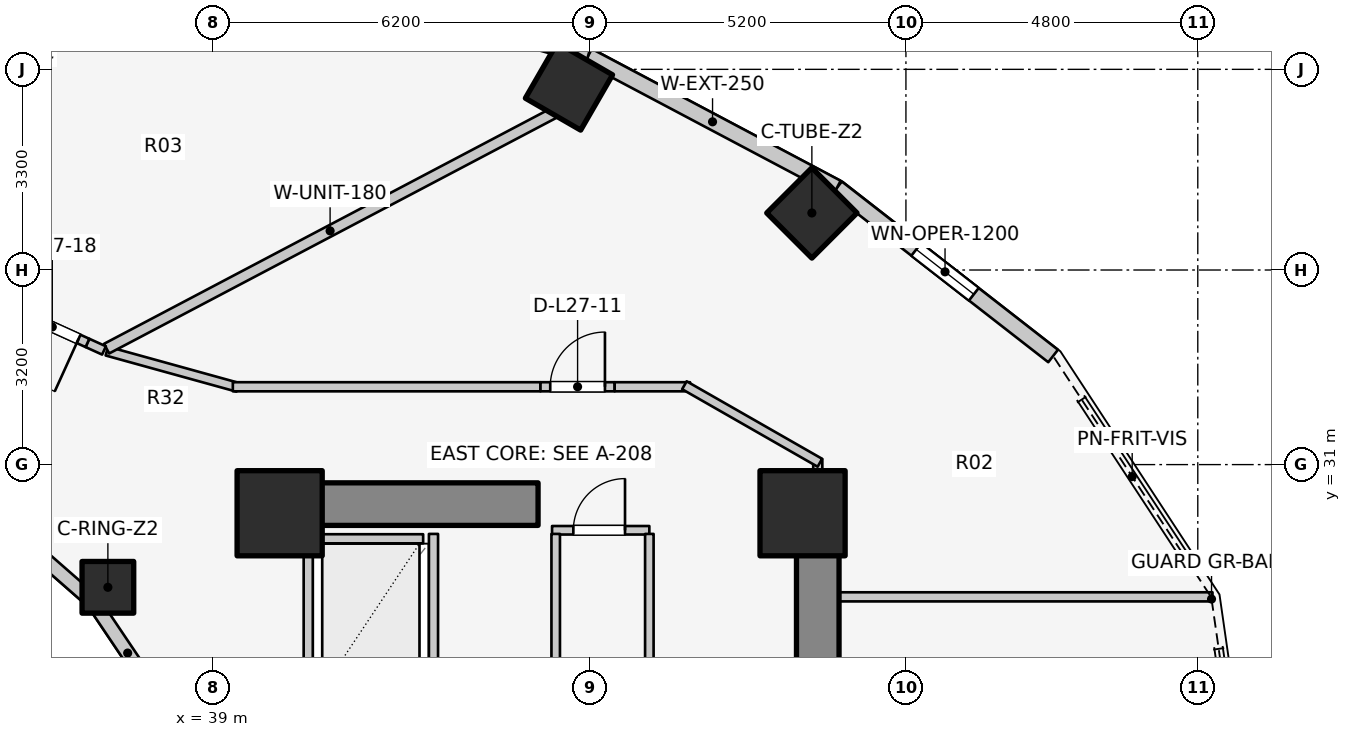
"""IFC4 building model, lengths in metres.
Left out: names, types, materials, properties, quantities, classifications, styles, units other than length and angle.
Written with IfcOpenShell. Run it as: python <this file> out.ifc"""

import sys

from ifc_helpers import new_model, si_unit, direction, frame, frame_2d, origin, origin_2d, place, context, subcontext, project, spatial, rectangle, extrude, element, fill, save


model = new_model("IFC4")
c1 = context("Model", 3, precision=1e-05, world=origin(), true_north=direction((0.0, 1.0)))
c2 = subcontext(c1, "Body", "Model", "MODEL_VIEW")
j1 = project(units=[si_unit("LENGTHUNIT", "METRE"), si_unit("PLANEANGLEUNIT", "RADIAN")], contexts=[c1])
p1 = place(None, origin())
s1 = spatial("IfcSite", under=j1, at=p1, CompositionType="ELEMENT")
p2 = place(p1, origin())
s2 = spatial("IfcBuilding", under=s1, at=p2, CompositionType="ELEMENT")
p3 = place(p2, frame((0.0, 0.0, 91.8)))
s3 = spatial("IfcBuildingStorey", under=s2, at=p3, CompositionType="ELEMENT", Elevation=91.8)
p4 = place(p3, frame((48.95, 17.05, 0.0), z_axis=(0.0, 0.0, 1.0), x_axis=(0.0, 1.0, 0.0)))
e1 = element("IfcWall", 1, at=p4, inside=s3, PredefinedType="SHEAR", context=c2, shape_type="SweptSolid", body=[
    extrude(rectangle(XDim=12.8, YDim=0.7, at=frame_2d((6.4, 0.0))), origin(), (0.0, 0.0, 1.0), 3.1),
])
p5 = place(p3, frame((39.85, 30.35, 0.0), z_axis=(0.0, 0.0, 1.0), x_axis=(1.0, 0.0, 0.0)))
e2 = element("IfcWall", 2, at=p5, inside=s3, PredefinedType="SHEAR", context=c2, shape_type="SweptSolid", body=[
    extrude(rectangle(XDim=4.5, YDim=0.7, at=frame_2d((2.25, 0.0))), origin(), (0.0, 0.0, 1.0), 3.1),
])
for number, where, z_axis, x_axis in (
    (3, (48.7, 30.2, 0.0), (0.0, 0.0, 1.0), (1.0, 0.0, 0.0)),
    (4, (40.1, 30.2, 0.0), (0.0, 0.0, 1.0), (1.0, 0.0, 0.0)),
):
    element("IfcColumn", number, at=place(p3, frame(where, z_axis=z_axis, x_axis=x_axis)), inside=s3, PredefinedType="COLUMN", context=c2, shape_type="SweptSolid", body=[
        extrude(rectangle(XDim=1.4, YDim=1.4, at=origin_2d()), origin(), (0.0, 0.0, 1.0), 3.1),
    ])
p6 = place(p3, frame((37.275, 28.982, 0.0), z_axis=(0.0, 0.0, 1.0), x_axis=(1.0, 0.0, 0.0)))
e5 = element("IfcColumn", 5, at=p6, inside=s3, PredefinedType="COLUMN", context=c2, shape_type="SweptSolid", body=[
    extrude(rectangle(XDim=0.85, YDim=0.85, at=origin_2d()), origin(), (0.0, 0.0, 1.0), 3.1),
])
for number, where, z_axis, x_axis in (
    (6, (48.853, 35.138, 0.0), (0.0, 0.0, 1.0), (0.707, 0.707, 0.0)),
    (7, (44.858, 37.218, 0.0), (0.0, 0.0, 1.0), (0.5, 0.866, 0.0)),
):
    element("IfcColumn", number, at=place(p3, frame(where, z_axis=z_axis, x_axis=x_axis)), inside=s3, PredefinedType="COLUMN", context=c2, shape_type="SweptSolid", body=[
        extrude(rectangle(XDim=1.05, YDim=1.05, at=origin_2d()), origin(), (0.0, 0.0, 1.0), 3.1),
    ])
p7 = place(p3, frame((38.166, 27.06, 0.0), z_axis=(0.0, 0.0, 1.0), x_axis=(-0.558197800898, 0.829707909492, 0.0)))
e8 = element("IfcWall", 8, at=p7, inside=s3, PredefinedType="STANDARD", context=c2, shape_type="SweptSolid", body=[
    extrude(rectangle(XDim=2.027, YDim=0.23, at=frame_2d((1.013, 0.0))), origin(), (0.0, 0.0, 1.0), 1.22),
])
p8 = place(p3, frame((37.035, 28.742, 0.0), z_axis=(0.0, 0.0, 1.0), x_axis=(-0.752576694707, 0.658504607869, 0.0)))
e9 = element("IfcWall", 9, at=p8, inside=s3, PredefinedType="STANDARD", context=c2, shape_type="SweptSolid", body=[
    extrude(rectangle(XDim=1.959, YDim=0.23, at=frame_2d((0.98, 0.0))), origin(), (0.0, 0.0, 1.0), 1.22),
])
p9 = place(p3, frame((52.821, 32.786, 0.0), z_axis=(0.0, 0.0, 1.0), x_axis=(-0.789127449954, 0.614229491094, 0.0)))
e10 = element("IfcWall", 10, at=p9, inside=s3, PredefinedType="STANDARD", context=c2, shape_type="SweptSolid", body=[
    extrude(rectangle(XDim=4.505, YDim=0.26, at=frame_2d((2.252, 0.0))), origin(), (0.0, 0.0, 1.0), 1.22),
])
p10 = place(p9, frame((1.652, 0.0, 0.15)))
e11 = element("IfcOpeningElement", 11, at=p10, cuts=e10, PredefinedType="OPENING", context=c2, shape_type="SweptSolid", body=[
    extrude(rectangle(XDim=1.2, YDim=0.9, at=frame_2d((0.6, 0.45))), frame((0.0, 0.14, 0.0), z_axis=(0.0, -1.0, 0.0), x_axis=(1.0, 0.0, 0.0)), (0.0, 0.0, 1.0), 0.28),
])
p11 = place(p3, frame((49.266, 35.553, 0.0), z_axis=(0.0, 0.0, 1.0), x_axis=(-0.883668636807, 0.4681129568, 0.0)))
e12 = element("IfcWall", 12, at=p11, inside=s3, PredefinedType="STANDARD", context=c2, shape_type="SweptSolid", body=[
    extrude(rectangle(XDim=4.631, YDim=0.26, at=frame_2d((2.316, 0.0))), origin(), (0.0, 0.0, 1.0), 1.22),
])
p12 = place(p3, frame((45.173, 37.721, 0.0), z_axis=(0.0, 0.0, 1.0), x_axis=(-0.962938491413, 0.269721081407, 0.0)))
e13 = element("IfcWall", 13, at=p12, inside=s3, PredefinedType="STANDARD", context=c2, shape_type="SweptSolid", body=[
    extrude(rectangle(XDim=5.563, YDim=0.26, at=frame_2d((2.782, 0.0))), origin(), (0.0, 0.0, 1.0), 1.22),
])
p13 = place(p12, frame((2.182, 0.0, 0.15)))
e14 = element("IfcOpeningElement", 14, at=p13, cuts=e13, PredefinedType="OPENING", context=c2, shape_type="SweptSolid", body=[
    extrude(rectangle(XDim=1.2, YDim=0.9, at=frame_2d((0.6, 0.45))), frame((0.0, 0.14, 0.0), z_axis=(0.0, -1.0, 0.0), x_axis=(1.0, 0.0, 0.0)), (0.0, 0.0, 1.0), 0.28),
])
p14 = place(p3, frame((40.74, 29.78, 0.0), z_axis=(0.0, 0.0, 1.0), x_axis=(1.0, 0.0, 0.0)))
e15 = element("IfcWall", 15, at=p14, inside=s3, PredefinedType="SOLIDWALL", context=c2, shape_type="SweptSolid", body=[
    extrude(rectangle(XDim=1.72, YDim=0.15, at=frame_2d((0.86, 0.0))), origin(), (0.0, 0.0, 1.0), 2.575),
])
for number, where, z_axis, x_axis in (
    (16, (40.57, 27.14, 0.0), (0.0, 0.0, 1.0), (0.0, 1.0, 0.0)),
    (17, (42.63, 27.14, 0.0), (0.0, 0.0, 1.0), (0.0, 1.0, 0.0)),
):
    element("IfcWall", number, at=place(p3, frame(where, z_axis=z_axis, x_axis=x_axis)), inside=s3, PredefinedType="SOLIDWALL", context=c2, shape_type="SweptSolid", body=[
        extrude(rectangle(XDim=2.72, YDim=0.15, at=frame_2d((1.36, 0.0))), origin(), (0.0, 0.0, 1.0), 2.575),
    ])
p15 = place(p3, frame((44.58, 29.92, 0.0), z_axis=(0.0, 0.0, 1.0), x_axis=(1.0, 0.0, 0.0)))
e18 = element("IfcWall", 18, at=p15, inside=s3, PredefinedType="PLUMBINGWALL", context=c2, shape_type="SweptSolid", body=[
    extrude(rectangle(XDim=1.6, YDim=0.14, at=frame_2d((0.8, 0.0))), origin(), (0.0, 0.0, 1.0), 2.575),
])
p16 = place(p15, frame((0.35, 0.0, 0.0)))
e19 = element("IfcOpeningElement", 19, at=p16, cuts=e18, PredefinedType="OPENING", context=c2, shape_type="SweptSolid", body=[
    extrude(rectangle(XDim=0.85, YDim=2.05, at=frame_2d((0.425, 1.025))), frame((0.0, 0.08, 0.0), z_axis=(0.0, -1.0, 0.0), x_axis=(1.0, 0.0, 0.0)), (0.0, 0.0, 1.0), 0.16),
])
for number, where, z_axis, x_axis in (
    (20, (44.64, 25.98, 0.0), (0.0, 0.0, 1.0), (0.0, 1.0, 0.0)),
    (21, (46.18, 25.98, 0.0), (0.0, 0.0, 1.0), (0.0, 1.0, 0.0)),
):
    element("IfcWall", number, at=place(p3, frame(where, z_axis=z_axis, x_axis=x_axis)), inside=s3, PredefinedType="PLUMBINGWALL", context=c2, shape_type="SweptSolid", body=[
        extrude(rectangle(XDim=3.88, YDim=0.14, at=frame_2d((1.94, 0.0))), origin(), (0.0, 0.0, 1.0), 2.575),
    ])
p17 = place(p3, frame((48.95, 28.825, 0.0), z_axis=(0.0, 0.0, 1.0), x_axis=(1.0, 0.0, 0.0)))
e22 = element("IfcWall", 22, at=p17, inside=s3, PredefinedType="PARTITIONING", context=c2, shape_type="SweptSolid", body=[
    extrude(rectangle(XDim=6.492, YDim=0.15, at=frame_2d((3.246, 0.0))), origin(), (0.0, 0.0, 1.0), 2.575),
])
p18 = place(p3, frame((48.95, 29.8, 0.0), z_axis=(0.0, 0.0, 1.0), x_axis=(0.0, 1.0, 0.0)))
e23 = element("IfcWall", 23, at=p18, inside=s3, PredefinedType="PARTITIONING", context=c2, shape_type="SweptSolid", body=[
    extrude(rectangle(XDim=1.29, YDim=0.15, at=frame_2d((0.645, 0.0))), origin(), (0.0, 0.0, 1.0), 1.22),
])
p19 = place(p3, frame((37.258, 32.867, 0.0), z_axis=(0.0, 0.0, 1.0), x_axis=(0.963833843713, -0.266503886865, 0.0)))
e24 = element("IfcWall", 24, at=p19, inside=s3, PredefinedType="PARTITIONING", context=c2, shape_type="SweptSolid", body=[
    extrude(rectangle(XDim=2.232, YDim=0.15, at=frame_2d((1.116, 0.0))), origin(), (0.0, 0.0, 1.0), 1.992),
])
p20 = place(p3, frame((39.33, 32.28, 0.0), z_axis=(0.0, 0.0, 1.0), x_axis=(1.0, 0.0, 0.0)))
e25 = element("IfcWall", 25, at=p20, inside=s3, PredefinedType="PARTITIONING", context=c2, shape_type="SweptSolid", body=[
    extrude(rectangle(XDim=5.06, YDim=0.15, at=frame_2d((2.53, 0.0))), origin(), (0.0, 0.0, 1.0), 1.992),
])
p21 = place(p3, frame((44.39, 32.28, 0.0), z_axis=(0.0, 0.0, 1.0), x_axis=(1.0, 0.0, 0.0)))
e26 = element("IfcWall", 26, at=p21, inside=s3, PredefinedType="PARTITIONING", context=c2, shape_type="SweptSolid", body=[
    extrude(rectangle(XDim=1.22, YDim=0.15, at=frame_2d((0.61, 0.0))), origin(), (0.0, 0.0, 1.0), 2.575),
])
p22 = place(p21, frame((0.16, 0.0, 0.0)))
e27 = element("IfcOpeningElement", 27, at=p22, cuts=e26, PredefinedType="OPENING", context=c2, shape_type="SweptSolid", body=[
    extrude(rectangle(XDim=0.9, YDim=2.1, at=frame_2d((0.45, 1.05))), frame((0.0, 0.085, 0.0), z_axis=(0.0, -1.0, 0.0), x_axis=(1.0, 0.0, 0.0)), (0.0, 0.0, 1.0), 0.17),
])
p23 = place(p3, frame((45.61, 32.28, 0.0), z_axis=(0.0, 0.0, 1.0), x_axis=(1.0, 0.0, 0.0)))
e28 = element("IfcWall", 28, at=p23, inside=s3, PredefinedType="PARTITIONING", context=c2, shape_type="SweptSolid", body=[
    extrude(rectangle(XDim=1.24, YDim=0.15, at=frame_2d((0.62, 0.0))), origin(), (0.0, 0.0, 1.0), 2.575),
])
p24 = place(p3, frame((46.757, 32.305, 0.0), z_axis=(0.0, 0.0, 1.0), x_axis=(0.867991349648, -0.496579315857, 0.0)))
e29 = element("IfcWall", 29, at=p24, inside=s3, PredefinedType="PARTITIONING", context=c2, shape_type="SweptSolid", body=[
    extrude(rectangle(XDim=2.567, YDim=0.15, at=frame_2d((1.283, 0.0))), origin(), (0.0, 0.0, 1.0), 1.22),
])
p25 = place(p3, frame((37.254, 32.907, 0.0), z_axis=(0.0, 0.0, 1.0), x_axis=(0.884730147854, 0.466103599512, 0.0)))
e30 = element("IfcWall", 30, at=p25, inside=s3, PredefinedType="PARTITIONING", context=c2, shape_type="SweptSolid", body=[
    extrude(rectangle(XDim=8.31, YDim=0.18, at=frame_2d((4.155, 0.0))), origin(), (0.0, 0.0, 1.0), 1.22),
])
p26 = place(p3, frame((37.211, 32.877, 0.0), z_axis=(0.0, 0.0, 1.0), x_axis=(-0.910618030944, 0.413249079514, 0.0)))
e31 = element("IfcWall", 31, at=p26, inside=s3, PredefinedType="PARTITIONING", context=c2, shape_type="SweptSolid", body=[
    extrude(rectangle(XDim=0.299, YDim=0.15, at=frame_2d((0.149, 0.0))), origin(), (0.0, 0.0, 1.0), 2.575),
])
p27 = place(p3, frame((36.939, 33.001, 0.0), z_axis=(0.0, 0.0, 1.0), x_axis=(-0.910563905594, 0.413368327075, 0.0)))
e32 = element("IfcWall", 32, at=p27, inside=s3, PredefinedType="PARTITIONING", context=c2, shape_type="SweptSolid", body=[
    extrude(rectangle(XDim=1.27, YDim=0.15, at=frame_2d((0.635, 0.0))), origin(), (0.0, 0.0, 1.0), 2.16),
])
p28 = place(p27, frame((0.16, 0.0, 0.0)))
e33 = element("IfcOpeningElement", 33, at=p28, cuts=e32, PredefinedType="OPENING", context=c2, shape_type="SweptSolid", body=[
    extrude(rectangle(XDim=0.95, YDim=2.1, at=frame_2d((0.475, 1.05))), frame((0.0, 0.085, 0.0), z_axis=(0.0, -1.0, 0.0), x_axis=(1.0, 0.0, 0.0)), (0.0, 0.0, 1.0), 0.17),
])
p29 = place(p10, origin())
e34 = element("IfcWindow", 34, at=p29, inside=s3, PartitioningType="SINGLE_PANEL", PredefinedType="WINDOW", context=c2, shape_type="SweptSolid", body=[
    extrude(rectangle(XDim=1.2, YDim=0.9, at=frame_2d((0.6, 0.45))), frame((0.0, 0.03, 0.0), z_axis=(0.0, -1.0, 0.0), x_axis=(1.0, 0.0, 0.0)), (0.0, 0.0, 1.0), 0.06),
])
fill(e11, e34)
p30 = place(p16, origin())
e35 = element("IfcDoor", 35, at=p30, inside=s3, OperationType="SINGLE_SWING_RIGHT", PredefinedType="DOOR", context=c2, shape_type="SweptSolid", body=[
    extrude(rectangle(XDim=0.85, YDim=2.05, at=frame_2d((0.425, 1.025))), frame((0.0, 0.025, 0.0), z_axis=(0.0, -1.0, 0.0), x_axis=(1.0, 0.0, 0.0)), (0.0, 0.0, 1.0), 0.05),
])
fill(e19, e35)
p31 = place(p22, origin())
e36 = element("IfcDoor", 36, at=p31, inside=s3, OperationType="SINGLE_SWING_RIGHT", PredefinedType="DOOR", context=c2, shape_type="SweptSolid", body=[
    extrude(rectangle(XDim=0.9, YDim=2.1, at=frame_2d((0.45, 1.05))), frame((0.0, 0.025, 0.0), z_axis=(0.0, -1.0, 0.0), x_axis=(1.0, 0.0, 0.0)), (0.0, 0.0, 1.0), 0.05),
])
fill(e27, e36)
p32 = place(p28, origin())
e37 = element("IfcDoor", 37, at=p32, inside=s3, OperationType="SINGLE_SWING_LEFT", PredefinedType="DOOR", context=c2, shape_type="SweptSolid", body=[
    extrude(rectangle(XDim=0.95, YDim=2.1, at=frame_2d((0.475, 1.05))), frame((0.0, 0.025, 0.0), z_axis=(0.0, -1.0, 0.0), x_axis=(1.0, 0.0, 0.0)), (0.0, 0.0, 1.0), 0.05),
])
fill(e33, e37)
save(model, sys.argv[1])
